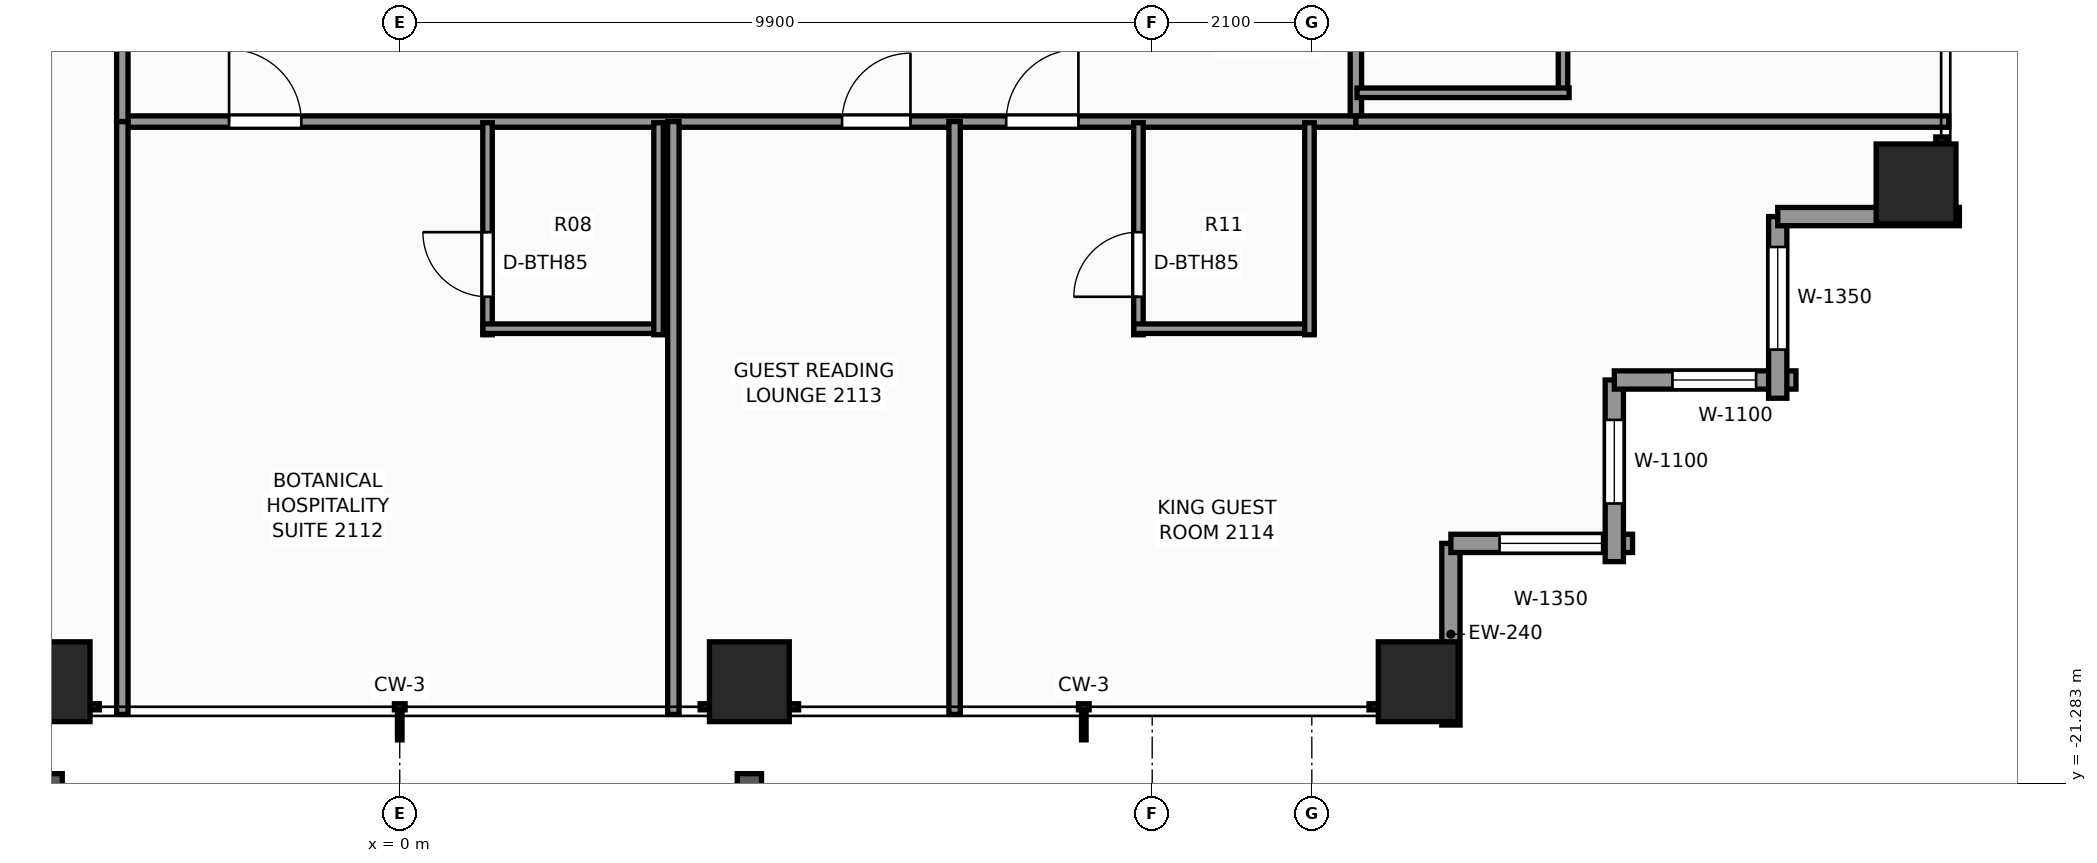
"""IFC4 building model, lengths in metres.
Left out: names, types, materials, properties, quantities, classifications, styles, units other than length and angle.
Written with IfcOpenShell. Run it as: python <this file> out.ifc"""

import sys

from ifc_helpers import new_model, si_unit, direction, frame, frame_2d, origin, origin_2d, place, context, subcontext, project, spatial, rectangle, extrude, element, fill, save


model = new_model("IFC4")
c1 = context("Model", 3, precision=1e-05, world=origin(), true_north=direction((0.0, 1.0)))
c2 = subcontext(c1, "Body", "Model", "MODEL_VIEW")
j1 = project(units=[si_unit("LENGTHUNIT", "METRE"), si_unit("PLANEANGLEUNIT", "RADIAN")], contexts=[c1])
p1 = place(None, origin())
s1 = spatial("IfcSite", under=j1, at=p1, CompositionType="ELEMENT")
p2 = place(p1, origin())
s2 = spatial("IfcBuilding", under=s1, at=p2, CompositionType="ELEMENT")
p3 = place(p2, frame((0.0, 0.0, 75.5)))
s3 = spatial("IfcBuildingStorey", under=s2, at=p3, CompositionType="ELEMENT", Elevation=75.5)
for number, where, z_axis, x_axis in (
    (1, (-4.6, -19.95, 0.0), (0.0, 0.0, 1.0), (1.0, 0.0, 0.0)),
    (2, (4.6, -19.95, 0.0), (0.0, 0.0, 1.0), (1.0, 0.0, 0.0)),
    (3, (13.4, -19.95, 0.0), (0.0, 0.0, 1.0), (1.0, 0.0, 0.0)),
    (4, (19.95, -13.4, 0.0), (0.0, 0.0, 1.0), (1.0, 0.0, 0.0)),
):
    element("IfcColumn", number, at=place(p3, frame(where, z_axis=z_axis, x_axis=x_axis)), inside=s3, PredefinedType="COLUMN", context=c2, shape_type="SweptSolid", body=[
        extrude(rectangle(XDim=1.05, YDim=1.05, at=origin_2d()), origin(), (0.0, 0.0, 1.0), 3.3),
    ])
p4 = place(p3, frame((13.83, -18.13, 0.0), z_axis=(0.0, 0.0, 1.0), x_axis=(0.0, -1.0, 0.0)))
e5 = element("IfcWall", 5, at=p4, inside=s3, PredefinedType="STANDARD", context=c2, shape_type="SweptSolid", body=[
    extrude(rectangle(XDim=2.39, YDim=0.24, at=frame_2d((1.195, 0.0))), origin(), (0.0, 0.0, 1.0), 2.459),
])
p5 = place(p3, frame((16.22, -18.13, 0.0), z_axis=(0.0, 0.0, 1.0), x_axis=(-1.0, 0.0, 0.0)))
e6 = element("IfcWall", 6, at=p5, inside=s3, PredefinedType="STANDARD", context=c2, shape_type="SweptSolid", body=[
    extrude(rectangle(XDim=2.39, YDim=0.24, at=frame_2d((1.195, 0.0))), origin(), (0.0, 0.0, 1.0), 2.459),
])
p6 = place(p5, frame((0.4, 0.0, 0.65)))
e7 = element("IfcOpeningElement", 7, at=p6, cuts=e6, PredefinedType="OPENING", context=c2, shape_type="SweptSolid", body=[
    extrude(rectangle(XDim=1.35, YDim=1.55, at=frame_2d((0.675, 0.775))), frame((0.0, 0.13, 0.0), z_axis=(0.0, -1.0, 0.0), x_axis=(1.0, 0.0, 0.0)), (0.0, 0.0, 1.0), 0.26),
])
p7 = place(p3, frame((15.98, -15.98, 0.0), z_axis=(0.0, 0.0, 1.0), x_axis=(0.0, -1.0, 0.0)))
e8 = element("IfcWall", 8, at=p7, inside=s3, PredefinedType="STANDARD", context=c2, shape_type="SweptSolid", body=[
    extrude(rectangle(XDim=2.39, YDim=0.24, at=frame_2d((1.195, 0.0))), origin(), (0.0, 0.0, 1.0), 2.459),
])
p8 = place(p7, frame((0.525, 0.0, 0.65)))
e9 = element("IfcOpeningElement", 9, at=p8, cuts=e8, PredefinedType="OPENING", context=c2, shape_type="SweptSolid", body=[
    extrude(rectangle(XDim=1.1, YDim=1.45, at=frame_2d((0.55, 0.725))), frame((0.0, 0.13, 0.0), z_axis=(0.0, -1.0, 0.0), x_axis=(1.0, 0.0, 0.0)), (0.0, 0.0, 1.0), 0.26),
])
p9 = place(p3, frame((18.37, -15.98, 0.0), z_axis=(0.0, 0.0, 1.0), x_axis=(-1.0, 0.0, 0.0)))
e10 = element("IfcWall", 10, at=p9, inside=s3, PredefinedType="STANDARD", context=c2, shape_type="SweptSolid", body=[
    extrude(rectangle(XDim=2.39, YDim=0.24, at=frame_2d((1.195, 0.0))), origin(), (0.0, 0.0, 1.0), 2.459),
])
p10 = place(p9, frame((0.525, 0.0, 0.65)))
e11 = element("IfcOpeningElement", 11, at=p10, cuts=e10, PredefinedType="OPENING", context=c2, shape_type="SweptSolid", body=[
    extrude(rectangle(XDim=1.1, YDim=1.45, at=frame_2d((0.55, 0.725))), frame((0.0, 0.13, 0.0), z_axis=(0.0, -1.0, 0.0), x_axis=(1.0, 0.0, 0.0)), (0.0, 0.0, 1.0), 0.26),
])
p11 = place(p3, frame((18.13, -13.83, 0.0), z_axis=(0.0, 0.0, 1.0), x_axis=(0.0, -1.0, 0.0)))
e12 = element("IfcWall", 12, at=p11, inside=s3, PredefinedType="STANDARD", context=c2, shape_type="SweptSolid", body=[
    extrude(rectangle(XDim=2.39, YDim=0.24, at=frame_2d((1.195, 0.0))), origin(), (0.0, 0.0, 1.0), 2.459),
])
p12 = place(p11, frame((0.4, 0.0, 0.65)))
e13 = element("IfcOpeningElement", 13, at=p12, cuts=e12, PredefinedType="OPENING", context=c2, shape_type="SweptSolid", body=[
    extrude(rectangle(XDim=1.35, YDim=1.55, at=frame_2d((0.675, 0.775))), frame((0.0, 0.13, 0.0), z_axis=(0.0, -1.0, 0.0), x_axis=(1.0, 0.0, 0.0)), (0.0, 0.0, 1.0), 0.26),
])
p13 = place(p3, frame((20.52, -13.83, 0.0), z_axis=(0.0, 0.0, 1.0), x_axis=(-1.0, 0.0, 0.0)))
e14 = element("IfcWall", 14, at=p13, inside=s3, PredefinedType="STANDARD", context=c2, shape_type="SweptSolid", body=[
    extrude(rectangle(XDim=2.39, YDim=0.24, at=frame_2d((1.195, 0.0))), origin(), (0.0, 0.0, 1.0), 2.459),
])
p14 = place(p3, frame((12.58, -12.58, 0.0), z_axis=(0.0, 0.0, 1.0), x_axis=(0.0, 1.0, 0.0)))
e15 = element("IfcWall", 15, at=p14, inside=s3, PredefinedType="PARTITIONING", context=c2, shape_type="SweptSolid", body=[
    extrude(rectangle(XDim=24.84, YDim=0.15, at=frame_2d((12.42, 0.0))), origin(), (0.0, 0.0, 1.0), 2.292),
])
p15 = place(p14, frame((4.149, 0.0, 0.0)))
e16 = element("IfcOpeningElement", 16, at=p15, cuts=e15, PredefinedType="OPENING", context=c2, shape_type="SweptSolid", body=[
    extrude(rectangle(XDim=0.95, YDim=2.06, at=frame_2d((0.475, 1.03))), frame((0.0, 0.085, 0.0), z_axis=(0.0, -1.0, 0.0), x_axis=(1.0, 0.0, 0.0)), (0.0, 0.0, 1.0), 0.17),
])
p16 = place(p14, frame((10.28, 0.0, 0.0)))
e17 = element("IfcOpeningElement", 17, at=p16, cuts=e15, PredefinedType="OPENING", context=c2, shape_type="SweptSolid", body=[
    extrude(rectangle(XDim=0.95, YDim=2.06, at=frame_2d((0.475, 1.03))), frame((0.0, 0.085, 0.0), z_axis=(0.0, -1.0, 0.0), x_axis=(1.0, 0.0, 0.0)), (0.0, 0.0, 1.0), 0.17),
])
p17 = place(p14, frame((18.983, 0.0, 0.0)))
e18 = element("IfcOpeningElement", 18, at=p17, cuts=e15, PredefinedType="OPENING", context=c2, shape_type="SweptSolid", body=[
    extrude(rectangle(XDim=0.95, YDim=2.06, at=frame_2d((0.475, 1.03))), frame((0.0, 0.085, 0.0), z_axis=(0.0, -1.0, 0.0), x_axis=(1.0, 0.0, 0.0)), (0.0, 0.0, 1.0), 0.17),
])
p18 = place(p14, frame((20.996, 0.0, 0.0)))
e19 = element("IfcOpeningElement", 19, at=p18, cuts=e15, PredefinedType="OPENING", context=c2, shape_type="SweptSolid", body=[
    extrude(rectangle(XDim=0.9, YDim=2.06, at=frame_2d((0.45, 1.03))), frame((0.0, 0.085, 0.0), z_axis=(0.0, -1.0, 0.0), x_axis=(1.0, 0.0, 0.0)), (0.0, 0.0, 1.0), 0.17),
])
p19 = place(p3, frame((-3.65, -12.58, 0.0), z_axis=(0.0, 0.0, 1.0), x_axis=(1.0, 0.0, 0.0)))
e20 = element("IfcWall", 20, at=p19, inside=s3, PredefinedType="PARTITIONING", context=c2, shape_type="SweptSolid", body=[
    extrude(rectangle(XDim=16.23, YDim=0.15, at=frame_2d((8.115, 0.0))), origin(), (0.0, 0.0, 1.0), 2.292),
])
p20 = place(p19, frame((1.405, 0.0, 0.0)))
e21 = element("IfcOpeningElement", 21, at=p20, cuts=e20, PredefinedType="OPENING", context=c2, shape_type="SweptSolid", body=[
    extrude(rectangle(XDim=0.95, YDim=2.06, at=frame_2d((0.475, 1.03))), frame((0.0, 0.085, 0.0), z_axis=(0.0, -1.0, 0.0), x_axis=(1.0, 0.0, 0.0)), (0.0, 0.0, 1.0), 0.17),
])
p21 = place(p19, frame((9.469, 0.0, 0.0)))
e22 = element("IfcOpeningElement", 22, at=p21, cuts=e20, PredefinedType="OPENING", context=c2, shape_type="SweptSolid", body=[
    extrude(rectangle(XDim=0.9, YDim=2.06, at=frame_2d((0.45, 1.03))), frame((0.0, 0.085, 0.0), z_axis=(0.0, -1.0, 0.0), x_axis=(1.0, 0.0, 0.0)), (0.0, 0.0, 1.0), 0.17),
])
p22 = place(p19, frame((11.629, 0.0, 0.0)))
e23 = element("IfcOpeningElement", 23, at=p22, cuts=e20, PredefinedType="OPENING", context=c2, shape_type="SweptSolid", body=[
    extrude(rectangle(XDim=0.95, YDim=2.06, at=frame_2d((0.475, 1.03))), frame((0.0, 0.085, 0.0), z_axis=(0.0, -1.0, 0.0), x_axis=(1.0, 0.0, 0.0)), (0.0, 0.0, 1.0), 0.17),
])
p23 = place(p3, frame((-3.65, -12.58, 0.0), z_axis=(0.0, 0.0, 1.0), x_axis=(0.0, 1.0, 0.0)))
e24 = element("IfcWall", 24, at=p23, inside=s3, PredefinedType="PARTITIONING", context=c2, shape_type="SweptSolid", body=[
    extrude(rectangle(XDim=2.68, YDim=0.15, at=frame_2d((1.34, 0.0))), origin(), (0.0, 0.0, 1.0), 3.08),
])
p24 = place(p3, frame((12.58, -12.58, 0.0), z_axis=(0.0, 0.0, 1.0), x_axis=(1.0, 0.0, 0.0)))
e25 = element("IfcWall", 25, at=p24, inside=s3, PredefinedType="PARTITIONING", context=c2, shape_type="SweptSolid", body=[
    extrude(rectangle(XDim=7.8, YDim=0.15, at=frame_2d((3.9, 0.0))), origin(), (0.0, 0.0, 1.0), 2.292),
])
p25 = place(p3, frame((15.305, -12.261, 0.0), z_axis=(0.0, 0.0, 1.0), x_axis=(0.0, 1.0, 0.0)))
e26 = element("IfcWall", 26, at=p25, inside=s3, PredefinedType="PARTITIONING", context=c2, shape_type="SweptSolid", body=[
    extrude(rectangle(XDim=2.37, YDim=0.125, at=frame_2d((1.185, 0.0))), origin(), (0.0, 0.0, 1.0), 2.292),
])
p26 = place(p3, frame((12.595, -12.201, 0.0), z_axis=(0.0, 0.0, 1.0), x_axis=(1.0, 0.0, 0.0)))
e27 = element("IfcWall", 27, at=p26, inside=s3, PredefinedType="PARTITIONING", context=c2, shape_type="SweptSolid", body=[
    extrude(rectangle(XDim=2.79, YDim=0.125, at=frame_2d((1.395, 0.0))), origin(), (0.0, 0.0, 1.0), 3.08),
])
for number, where, z_axis, x_axis in (
    (28, (-3.65, -20.38, 0.0), (0.0, 0.0, 1.0), (0.0, 1.0, 0.0)),
    (29, (3.6, -20.38, 0.0), (0.0, 0.0, 1.0), (0.0, 1.0, 0.0)),
):
    element("IfcWall", number, at=place(p3, frame(where, z_axis=z_axis, x_axis=x_axis)), inside=s3, PredefinedType="PARTITIONING", context=c2, shape_type="SweptSolid", body=[
        extrude(rectangle(XDim=7.8, YDim=0.15, at=frame_2d((3.9, 0.0))), origin(), (0.0, 0.0, 1.0), 2.449),
    ])
p27 = place(p3, frame((1.155, -15.385, 0.0), z_axis=(0.0, 0.0, 1.0), x_axis=(0.0, 1.0, 0.0)))
e30 = element("IfcWall", 30, at=p27, inside=s3, PredefinedType="PARTITIONING", context=c2, shape_type="SweptSolid", body=[
    extrude(rectangle(XDim=2.79, YDim=0.125, at=frame_2d((1.395, 0.0))), origin(), (0.0, 0.0, 1.0), 3.08),
])
p28 = place(p27, frame((0.5, 0.0, 0.0)))
e31 = element("IfcOpeningElement", 31, at=p28, cuts=e30, PredefinedType="OPENING", context=c2, shape_type="SweptSolid", body=[
    extrude(rectangle(XDim=0.85, YDim=2.03, at=frame_2d((0.425, 1.015))), frame((0.0, 0.073, 0.0), z_axis=(0.0, -1.0, 0.0), x_axis=(1.0, 0.0, 0.0)), (0.0, 0.0, 1.0), 0.145),
])
p29 = place(p3, frame((1.095, -15.305, 0.0), z_axis=(0.0, 0.0, 1.0), x_axis=(1.0, 0.0, 0.0)))
e32 = element("IfcWall", 32, at=p29, inside=s3, PredefinedType="PARTITIONING", context=c2, shape_type="SweptSolid", body=[
    extrude(rectangle(XDim=2.37, YDim=0.125, at=frame_2d((1.185, 0.0))), origin(), (0.0, 0.0, 1.0), 2.369),
])
p30 = place(p3, frame((3.405, -15.385, 0.0), z_axis=(0.0, 0.0, 1.0), x_axis=(0.0, 1.0, 0.0)))
e33 = element("IfcWall", 33, at=p30, inside=s3, PredefinedType="PARTITIONING", context=c2, shape_type="SweptSolid", body=[
    extrude(rectangle(XDim=2.79, YDim=0.125, at=frame_2d((1.395, 0.0))), origin(), (0.0, 0.0, 1.0), 3.08),
])
p31 = place(p3, frame((7.3, -20.38, 0.0), z_axis=(0.0, 0.0, 1.0), x_axis=(0.0, 1.0, 0.0)))
e34 = element("IfcWall", 34, at=p31, inside=s3, PredefinedType="PARTITIONING", context=c2, shape_type="SweptSolid", body=[
    extrude(rectangle(XDim=7.8, YDim=0.15, at=frame_2d((3.9, 0.0))), origin(), (0.0, 0.0, 1.0), 2.449),
])
p32 = place(p3, frame((9.719, -15.385, 0.0), z_axis=(0.0, 0.0, 1.0), x_axis=(0.0, 1.0, 0.0)))
e35 = element("IfcWall", 35, at=p32, inside=s3, PredefinedType="PARTITIONING", context=c2, shape_type="SweptSolid", body=[
    extrude(rectangle(XDim=2.79, YDim=0.125, at=frame_2d((1.395, 0.0))), origin(), (0.0, 0.0, 1.0), 3.08),
])
p33 = place(p32, frame((0.5, 0.0, 0.0)))
e36 = element("IfcOpeningElement", 36, at=p33, cuts=e35, PredefinedType="OPENING", context=c2, shape_type="SweptSolid", body=[
    extrude(rectangle(XDim=0.85, YDim=2.03, at=frame_2d((0.425, 1.015))), frame((0.0, 0.073, 0.0), z_axis=(0.0, -1.0, 0.0), x_axis=(1.0, 0.0, 0.0)), (0.0, 0.0, 1.0), 0.145),
])
p34 = place(p3, frame((9.659, -15.305, 0.0), z_axis=(0.0, 0.0, 1.0), x_axis=(1.0, 0.0, 0.0)))
e37 = element("IfcWall", 37, at=p34, inside=s3, PredefinedType="PARTITIONING", context=c2, shape_type="SweptSolid", body=[
    extrude(rectangle(XDim=2.37, YDim=0.125, at=frame_2d((1.185, 0.0))), origin(), (0.0, 0.0, 1.0), 2.292),
])
p35 = place(p3, frame((11.969, -15.385, 0.0), z_axis=(0.0, 0.0, 1.0), x_axis=(0.0, 1.0, 0.0)))
e38 = element("IfcWall", 38, at=p35, inside=s3, PredefinedType="PARTITIONING", context=c2, shape_type="SweptSolid", body=[
    extrude(rectangle(XDim=2.79, YDim=0.125, at=frame_2d((1.395, 0.0))), origin(), (0.0, 0.0, 1.0), 2.292),
])
p36 = place(p6, origin())
e39 = element("IfcWindow", 39, at=p36, inside=s3, PartitioningType="SINGLE_PANEL", PredefinedType="WINDOW", context=c2, shape_type="SweptSolid", body=[
    extrude(rectangle(XDim=1.35, YDim=1.55, at=frame_2d((0.675, 0.775))), frame((0.0, 0.03, 0.0), z_axis=(0.0, -1.0, 0.0), x_axis=(1.0, 0.0, 0.0)), (0.0, 0.0, 1.0), 0.06),
])
fill(e7, e39)
p37 = place(p8, origin())
e40 = element("IfcWindow", 40, at=p37, inside=s3, PartitioningType="SINGLE_PANEL", PredefinedType="WINDOW", context=c2, shape_type="SweptSolid", body=[
    extrude(rectangle(XDim=1.1, YDim=1.45, at=frame_2d((0.55, 0.725))), frame((0.0, 0.03, 0.0), z_axis=(0.0, -1.0, 0.0), x_axis=(1.0, 0.0, 0.0)), (0.0, 0.0, 1.0), 0.06),
])
fill(e9, e40)
p38 = place(p10, origin())
e41 = element("IfcWindow", 41, at=p38, inside=s3, PartitioningType="SINGLE_PANEL", PredefinedType="WINDOW", context=c2, shape_type="SweptSolid", body=[
    extrude(rectangle(XDim=1.1, YDim=1.45, at=frame_2d((0.55, 0.725))), frame((0.0, 0.03, 0.0), z_axis=(0.0, -1.0, 0.0), x_axis=(1.0, 0.0, 0.0)), (0.0, 0.0, 1.0), 0.06),
])
fill(e11, e41)
p39 = place(p12, origin())
e42 = element("IfcWindow", 42, at=p39, inside=s3, PartitioningType="SINGLE_PANEL", PredefinedType="WINDOW", context=c2, shape_type="SweptSolid", body=[
    extrude(rectangle(XDim=1.35, YDim=1.55, at=frame_2d((0.675, 0.775))), frame((0.0, 0.03, 0.0), z_axis=(0.0, -1.0, 0.0), x_axis=(1.0, 0.0, 0.0)), (0.0, 0.0, 1.0), 0.06),
])
fill(e13, e42)
p40 = place(p28, origin())
e43 = element("IfcDoor", 43, at=p40, inside=s3, OperationType="SINGLE_SWING_RIGHT", PredefinedType="DOOR", context=c2, shape_type="SweptSolid", body=[
    extrude(rectangle(XDim=0.85, YDim=2.03, at=frame_2d((0.425, 1.015))), frame((0.0, 0.025, 0.0), z_axis=(0.0, -1.0, 0.0), x_axis=(1.0, 0.0, 0.0)), (0.0, 0.0, 1.0), 0.05),
])
fill(e31, e43)
p41 = place(p20, origin())
e44 = element("IfcDoor", 44, at=p41, inside=s3, OperationType="SINGLE_SWING_LEFT", PredefinedType="DOOR", context=c2, shape_type="SweptSolid", body=[
    extrude(rectangle(XDim=0.95, YDim=2.06, at=frame_2d((0.475, 1.03))), frame((0.0, 0.025, 0.0), z_axis=(0.0, -1.0, 0.0), x_axis=(1.0, 0.0, 0.0)), (0.0, 0.0, 1.0), 0.05),
])
fill(e21, e44)
p42 = place(p21, origin())
e45 = element("IfcDoor", 45, at=p42, inside=s3, OperationType="SINGLE_SWING_RIGHT", PredefinedType="DOOR", context=c2, shape_type="SweptSolid", body=[
    extrude(rectangle(XDim=0.9, YDim=2.06, at=frame_2d((0.45, 1.03))), frame((0.0, 0.025, 0.0), z_axis=(0.0, -1.0, 0.0), x_axis=(1.0, 0.0, 0.0)), (0.0, 0.0, 1.0), 0.05),
])
fill(e22, e45)
p43 = place(p33, origin())
e46 = element("IfcDoor", 46, at=p43, inside=s3, OperationType="SINGLE_SWING_LEFT", PredefinedType="DOOR", context=c2, shape_type="SweptSolid", body=[
    extrude(rectangle(XDim=0.85, YDim=2.03, at=frame_2d((0.425, 1.015))), frame((0.0, 0.025, 0.0), z_axis=(0.0, -1.0, 0.0), x_axis=(1.0, 0.0, 0.0)), (0.0, 0.0, 1.0), 0.05),
])
fill(e36, e46)
p44 = place(p22, origin())
e47 = element("IfcDoor", 47, at=p44, inside=s3, OperationType="SINGLE_SWING_RIGHT", PredefinedType="DOOR", context=c2, shape_type="SweptSolid", body=[
    extrude(rectangle(XDim=0.95, YDim=2.06, at=frame_2d((0.475, 1.03))), frame((0.0, 0.025, 0.0), z_axis=(0.0, -1.0, 0.0), x_axis=(1.0, 0.0, 0.0)), (0.0, 0.0, 1.0), 0.05),
])
fill(e23, e47)
save(model, sys.argv[1])
